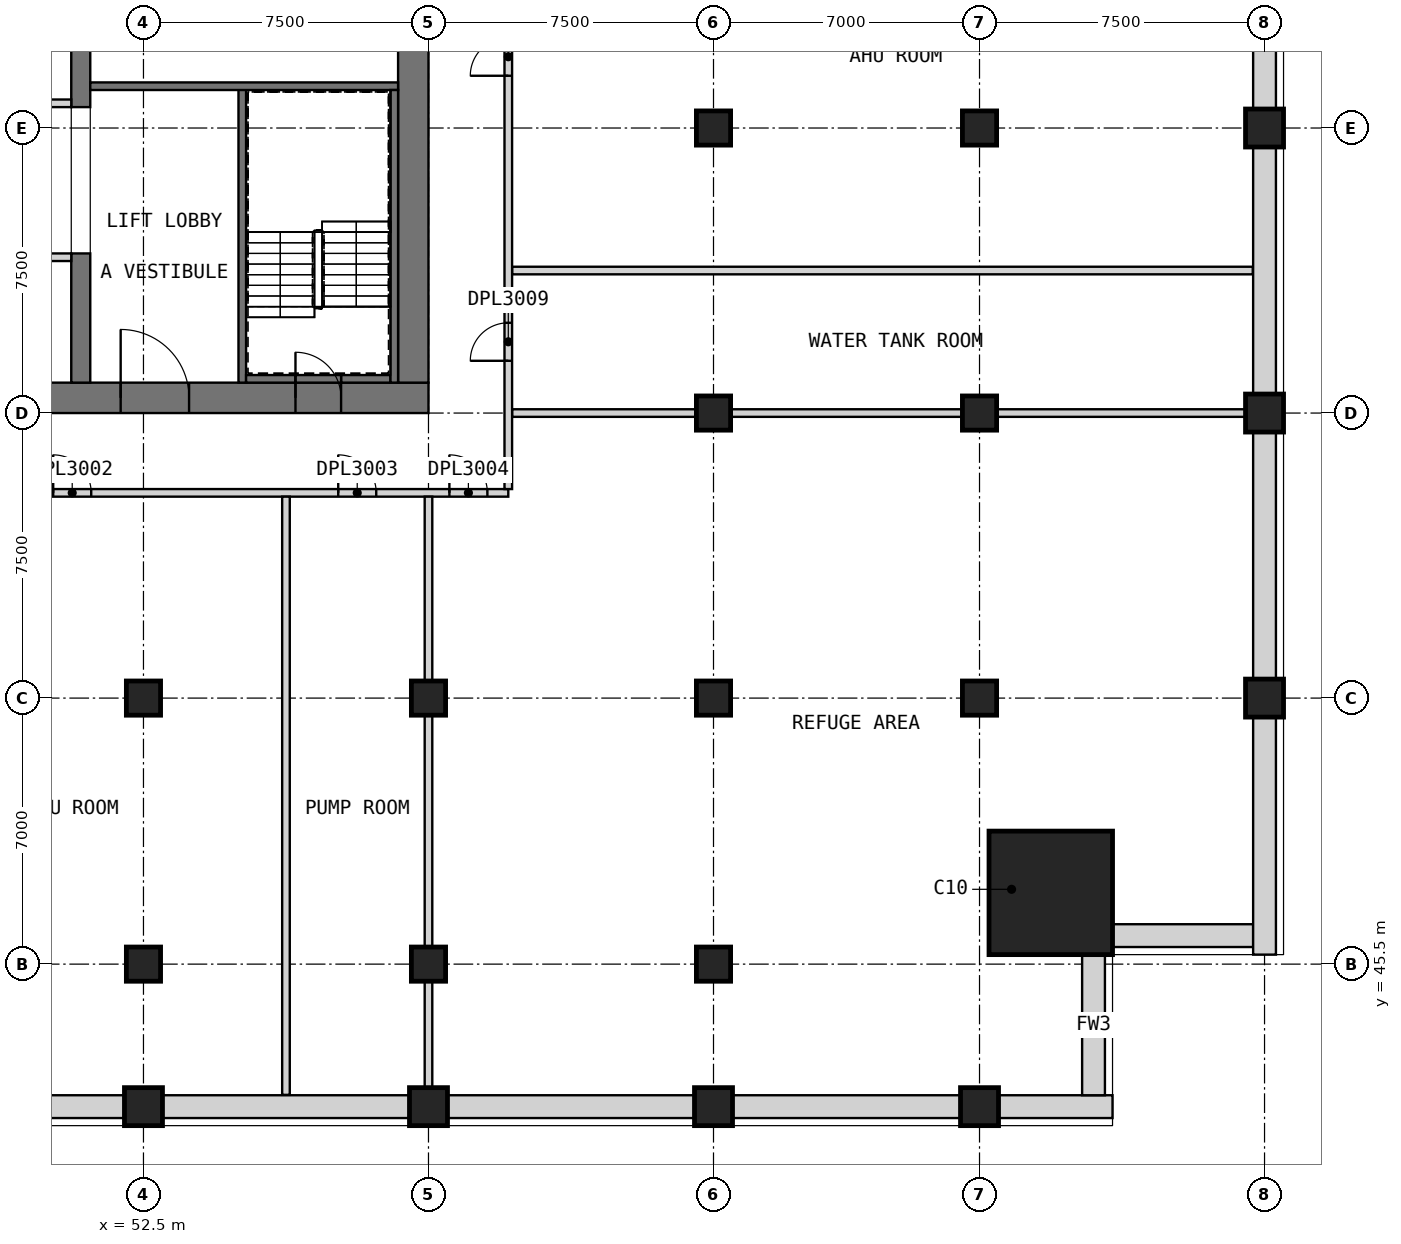
"""IFC4 building model, lengths in metres.
Left out: names, types, materials, properties, quantities, classifications, styles, units other than length and angle.
Written with IfcOpenShell. Run it as: python <this file> out.ifc"""

import sys

from ifc_helpers import new_model, si_unit, direction, frame, frame_2d, origin, origin_2d, place, context, subcontext, project, spatial, rectangle, extrude, element, fill, save


model = new_model("IFC4")
c1 = context("Model", 3, precision=1e-05, world=origin(), true_north=direction((0.0, 1.0)))
c2 = subcontext(c1, "Body", "Model", "MODEL_VIEW")
j1 = project(units=[si_unit("LENGTHUNIT", "METRE"), si_unit("PLANEANGLEUNIT", "RADIAN")], contexts=[c1])
p1 = place(None, origin())
s1 = spatial("IfcSite", under=j1, at=p1, CompositionType="ELEMENT")
p2 = place(p1, origin())
s2 = spatial("IfcBuilding", under=s1, at=p2, CompositionType="ELEMENT")
p3 = place(p2, frame((0.0, 0.0, 214.2)))
s3 = spatial("IfcBuildingStorey", under=s2, at=p3, CompositionType="ELEMENT", Elevation=214.2)
for number, where, z_axis, x_axis in (
    (1, (52.5, 41.75, 0.0), (0.0, 0.0, 1.0), (1.0, 0.0, 0.0)),
    (2, (60.0, 41.75, 0.0), (0.0, 0.0, 1.0), (1.0, 0.0, 0.0)),
    (3, (67.5, 41.75, 0.0), (0.0, 0.0, 1.0), (1.0, 0.0, 0.0)),
    (4, (74.5, 41.75, 0.0), (0.0, 0.0, 1.0), (1.0, 0.0, 0.0)),
):
    element("IfcColumn", number, at=place(p3, frame(where, z_axis=z_axis, x_axis=x_axis)), inside=s3, PredefinedType="COLUMN", context=c2, shape_type="SweptSolid", body=[
        extrude(rectangle(XDim=1.0, YDim=1.0, at=origin_2d()), origin(), (0.0, 0.0, 1.0), 5.5),
    ])
for number, where, z_axis, x_axis in (
    (5, (52.5, 45.5, 0.0), (0.0, 0.0, 1.0), (1.0, 0.0, 0.0)),
    (6, (52.5, 52.5, 0.0), (0.0, 0.0, 1.0), (1.0, 0.0, 0.0)),
    (7, (60.0, 45.5, 0.0), (0.0, 0.0, 1.0), (1.0, 0.0, 0.0)),
    (8, (60.0, 52.5, 0.0), (0.0, 0.0, 1.0), (1.0, 0.0, 0.0)),
    (9, (67.5, 45.5, 0.0), (0.0, 0.0, 1.0), (1.0, 0.0, 0.0)),
    (10, (67.5, 52.5, 0.0), (0.0, 0.0, 1.0), (1.0, 0.0, 0.0)),
    (11, (67.5, 60.0, 0.0), (0.0, 0.0, 1.0), (1.0, 0.0, 0.0)),
    (12, (67.5, 67.5, 0.0), (0.0, 0.0, 1.0), (1.0, 0.0, 0.0)),
    (13, (74.5, 52.5, 0.0), (0.0, 0.0, 1.0), (1.0, 0.0, 0.0)),
    (14, (74.5, 60.0, 0.0), (0.0, 0.0, 1.0), (1.0, 0.0, 0.0)),
    (15, (74.5, 67.5, 0.0), (0.0, 0.0, 1.0), (1.0, 0.0, 0.0)),
):
    element("IfcColumn", number, at=place(p3, frame(where, z_axis=z_axis, x_axis=x_axis)), inside=s3, PredefinedType="COLUMN", context=c2, shape_type="SweptSolid", body=[
        extrude(rectangle(XDim=0.9, YDim=0.9, at=origin_2d()), origin(), (0.0, 0.0, 1.0), 5.5),
    ])
for number, where, z_axis, x_axis in (
    (16, (82.0, 52.5, 0.0), (0.0, 0.0, 1.0), (1.0, 0.0, 0.0)),
    (17, (82.0, 60.0, 0.0), (0.0, 0.0, 1.0), (1.0, 0.0, 0.0)),
    (18, (82.0, 67.5, 0.0), (0.0, 0.0, 1.0), (1.0, 0.0, 0.0)),
):
    element("IfcColumn", number, at=place(p3, frame(where, z_axis=z_axis, x_axis=x_axis)), inside=s3, PredefinedType="COLUMN", context=c2, shape_type="SweptSolid", body=[
        extrude(rectangle(XDim=1.0, YDim=1.0, at=origin_2d()), origin(), (0.0, 0.0, 1.0), 5.5),
    ])
p4 = place(p3, frame((76.375, 47.375, 0.0), z_axis=(0.0, 0.0, 1.0), x_axis=(0.0, 1.0, 0.0)))
e19 = element("IfcColumn", 19, at=p4, inside=s3, PredefinedType="COLUMN", context=c2, shape_type="SweptSolid", body=[
    extrude(rectangle(XDim=3.25, YDim=3.25, at=origin_2d()), origin(), (0.032, 0.351, 0.936), 5.877),
])
p5 = place(p3, frame((30.0, 60.4, 0.0), z_axis=(0.0, 0.0, 1.0), x_axis=(1.0, 0.0, 0.0)))
e20 = element("IfcWall", 20, at=p5, inside=s3, PredefinedType="SHEAR", context=c2, shape_type="SweptSolid", body=[
    extrude(rectangle(XDim=30.0, YDim=0.8, at=frame_2d((15.0, 0.0))), origin(), (0.0, 0.0, 1.0), 5.5),
])
p6 = place(p5, frame((21.9, 0.0, 0.0)))
e21 = element("IfcOpeningElement", 21, at=p6, cuts=e20, PredefinedType="OPENING", context=c2, shape_type="SweptSolid", body=[
    extrude(rectangle(XDim=1.8, YDim=2.1, at=frame_2d((0.9, 1.05))), frame((0.0, 0.41, 0.0), z_axis=(0.0, -1.0, 0.0), x_axis=(1.0, 0.0, 0.0)), (0.0, 0.0, 1.0), 0.82),
])
p7 = place(p5, frame((26.5, 0.0, 0.0)))
e22 = element("IfcOpeningElement", 22, at=p7, cuts=e20, PredefinedType="OPENING", context=c2, shape_type="SweptSolid", body=[
    extrude(rectangle(XDim=1.2, YDim=2.1, at=frame_2d((0.6, 1.05))), frame((0.0, 0.41, 0.0), z_axis=(0.0, -1.0, 0.0), x_axis=(1.0, 0.0, 0.0)), (0.0, 0.0, 1.0), 0.82),
])
p8 = place(p3, frame((59.6, 60.8, 0.0), z_axis=(0.0, 0.0, 1.0), x_axis=(0.0, 1.0, 0.0)))
e23 = element("IfcWall", 23, at=p8, inside=s3, PredefinedType="SHEAR", context=c2, shape_type="SweptSolid", body=[
    extrude(rectangle(XDim=20.9, YDim=0.8, at=frame_2d((10.45, 0.0))), origin(), (0.0, 0.0, 1.0), 5.5),
])
p9 = place(p8, frame((14.7, 0.0, 0.0)))
e24 = element("IfcOpeningElement", 24, at=p9, cuts=e23, PredefinedType="OPENING", context=c2, shape_type="SweptSolid", body=[
    extrude(rectangle(XDim=1.8, YDim=2.1, at=frame_2d((0.9, 1.05))), frame((0.0, 0.41, 0.0), z_axis=(0.0, -1.0, 0.0), x_axis=(1.0, 0.0, 0.0)), (0.0, 0.0, 1.0), 0.82),
])
p10 = place(p3, frame((50.85, 60.8, 0.0), z_axis=(0.0, 0.0, 1.0), x_axis=(0.0, 1.0, 0.0)))
e25 = element("IfcWall", 25, at=p10, inside=s3, PredefinedType="SHEAR", context=c2, shape_type="SweptSolid", body=[
    extrude(rectangle(XDim=3.4, YDim=0.5, at=frame_2d((1.7, 0.0))), origin(), (0.0, 0.0, 1.0), 5.5),
])
p11 = place(p3, frame((50.85, 68.05, 0.0), z_axis=(0.0, 0.0, 1.0), x_axis=(0.0, 1.0, 0.0)))
e26 = element("IfcWall", 26, at=p11, inside=s3, PredefinedType="SHEAR", context=c2, shape_type="SweptSolid", body=[
    extrude(rectangle(XDim=6.4, YDim=0.5, at=frame_2d((3.2, 0.0))), origin(), (0.0, 0.0, 1.0), 5.5),
])
for number, where, z_axis, x_axis in (
    (27, (45.5, 41.75, 0.0), (0.0, 0.0, 1.0), (1.0, 0.0, 0.0)),
    (28, (53.0, 41.75, 0.0), (0.0, 0.0, 1.0), (1.0, 0.0, 0.0)),
    (29, (60.5, 41.75, 0.0), (0.0, 0.0, 1.0), (1.0, 0.0, 0.0)),
):
    element("IfcWall", number, at=place(p3, frame(where, z_axis=z_axis, x_axis=x_axis)), inside=s3, PredefinedType="ELEMENTEDWALL", context=c2, shape_type="SweptSolid", body=[
        extrude(rectangle(XDim=6.5, YDim=0.6, at=frame_2d((3.25, 0.0))), origin(), (0.0, 0.0, 1.0), 4.75),
    ])
p12 = place(p3, frame((68.0, 41.75, 0.0), z_axis=(0.0, 0.0, 1.0), x_axis=(1.0, 0.0, 0.0)))
e30 = element("IfcWall", 30, at=p12, inside=s3, PredefinedType="ELEMENTEDWALL", context=c2, shape_type="SweptSolid", body=[
    extrude(rectangle(XDim=6.0, YDim=0.6, at=frame_2d((3.0, 0.0))), origin(), (0.0, 0.0, 1.0), 4.75),
])
p13 = place(p3, frame((75.0, 41.75, 0.0), z_axis=(0.0, 0.0, 1.0), x_axis=(1.0, 0.0, 0.0)))
e31 = element("IfcWall", 31, at=p13, inside=s3, PredefinedType="ELEMENTEDWALL", context=c2, shape_type="SweptSolid", body=[
    extrude(rectangle(XDim=3.0, YDim=0.6, at=frame_2d((1.5, 0.0))), origin(), (0.0, 0.0, 1.0), 5.25),
])
for number, where, z_axis, x_axis in (
    (32, (77.5, 42.05, 0.0), (0.0, 0.0, 1.0), (0.0, 1.0, 0.0)),
    (33, (78.0, 46.25, 0.0), (0.0, 0.0, 1.0), (1.0, 0.0, 0.0)),
):
    element("IfcWall", number, at=place(p3, frame(where, z_axis=z_axis, x_axis=x_axis)), inside=s3, PredefinedType="ELEMENTEDWALL", context=c2, shape_type="SweptSolid", body=[
        extrude(rectangle(XDim=3.7, YDim=0.6, at=frame_2d((1.85, 0.0))), origin(), (0.0, 0.0, 1.0), 5.25),
    ])
p14 = place(p3, frame((82.0, 45.75, 0.0), z_axis=(0.0, 0.0, 1.0), x_axis=(0.0, 1.0, 0.0)))
e34 = element("IfcWall", 34, at=p14, inside=s3, PredefinedType="ELEMENTEDWALL", context=c2, shape_type="SweptSolid", body=[
    extrude(rectangle(XDim=6.25, YDim=0.6, at=frame_2d((3.125, 0.0))), origin(), (0.0, 0.0, 1.0), 5.25),
])
for number, where, z_axis, x_axis in (
    (35, (82.0, 53.0, 0.0), (0.0, 0.0, 1.0), (0.0, 1.0, 0.0)),
    (36, (82.0, 60.5, 0.0), (0.0, 0.0, 1.0), (0.0, 1.0, 0.0)),
    (37, (82.0, 68.0, 0.0), (0.0, 0.0, 1.0), (0.0, 1.0, 0.0)),
):
    element("IfcWall", number, at=place(p3, frame(where, z_axis=z_axis, x_axis=x_axis)), inside=s3, PredefinedType="ELEMENTEDWALL", context=c2, shape_type="SweptSolid", body=[
        extrude(rectangle(XDim=6.5, YDim=0.6, at=frame_2d((3.25, 0.0))), origin(), (0.0, 0.0, 1.0), 5.25),
    ])
p15 = place(p3, frame((35.0, 64.1, 0.0), z_axis=(0.0, 0.0, 1.0), x_axis=(1.0, 0.0, 0.0)))
e38 = element("IfcWall", 38, at=p15, inside=s3, PredefinedType="PARTITIONING", context=c2, shape_type="SweptSolid", body=[
    extrude(rectangle(XDim=15.6, YDim=0.2, at=frame_2d((7.8, 0.0))), origin(), (0.0, 0.0, 1.0), 5.25),
])
p16 = place(p15, frame((4.225, 0.0, 0.0)))
e39 = element("IfcOpeningElement", 39, at=p16, cuts=e38, PredefinedType="OPENING", context=c2, shape_type="SweptSolid", body=[
    extrude(rectangle(XDim=0.9, YDim=2.1, at=frame_2d((0.45, 1.05))), frame((0.0, 0.11, 0.0), z_axis=(0.0, -1.0, 0.0), x_axis=(1.0, 0.0, 0.0)), (0.0, 0.0, 1.0), 0.22),
])
p17 = place(p15, frame((12.025, 0.0, 0.0)))
e40 = element("IfcOpeningElement", 40, at=p17, cuts=e38, PredefinedType="OPENING", context=c2, shape_type="SweptSolid", body=[
    extrude(rectangle(XDim=0.9, YDim=2.1, at=frame_2d((0.45, 1.05))), frame((0.0, 0.11, 0.0), z_axis=(0.0, -1.0, 0.0), x_axis=(1.0, 0.0, 0.0)), (0.0, 0.0, 1.0), 0.22),
])
p18 = place(p3, frame((35.0, 68.15, 0.0), z_axis=(0.0, 0.0, 1.0), x_axis=(1.0, 0.0, 0.0)))
e41 = element("IfcWall", 41, at=p18, inside=s3, PredefinedType="PARTITIONING", context=c2, shape_type="SweptSolid", body=[
    extrude(rectangle(XDim=15.6, YDim=0.2, at=frame_2d((7.8, 0.0))), origin(), (0.0, 0.0, 1.0), 5.25),
])
p19 = place(p18, frame((4.0, 0.0, 0.0)))
e42 = element("IfcOpeningElement", 42, at=p19, cuts=e41, PredefinedType="OPENING", context=c2, shape_type="SweptSolid", body=[
    extrude(rectangle(XDim=0.9, YDim=2.1, at=frame_2d((0.45, 1.05))), frame((0.0, 0.11, 0.0), z_axis=(0.0, -1.0, 0.0), x_axis=(1.0, 0.0, 0.0)), (0.0, 0.0, 1.0), 0.22),
])
p20 = place(p18, frame((11.8, 0.0, 0.0)))
e43 = element("IfcOpeningElement", 43, at=p20, cuts=e41, PredefinedType="OPENING", context=c2, shape_type="SweptSolid", body=[
    extrude(rectangle(XDim=0.9, YDim=2.1, at=frame_2d((0.45, 1.05))), frame((0.0, 0.11, 0.0), z_axis=(0.0, -1.0, 0.0), x_axis=(1.0, 0.0, 0.0)), (0.0, 0.0, 1.0), 0.22),
])
p21 = place(p3, frame((55.1, 60.8, 0.0), z_axis=(0.0, 0.0, 1.0), x_axis=(0.0, 1.0, 0.0)))
e44 = element("IfcWall", 44, at=p21, inside=s3, PredefinedType="SOLIDWALL", context=c2, shape_type="SweptSolid", body=[
    extrude(rectangle(XDim=7.8, YDim=0.2, at=frame_2d((3.9, 0.0))), origin(), (0.0, 0.0, 1.0), 5.25),
])
p22 = place(p3, frame((51.1, 68.6, 0.0), z_axis=(0.0, 0.0, 1.0), x_axis=(1.0, 0.0, 0.0)))
e45 = element("IfcWall", 45, at=p22, inside=s3, PredefinedType="SOLIDWALL", context=c2, shape_type="SweptSolid", body=[
    extrude(rectangle(XDim=8.1, YDim=0.2, at=frame_2d((4.05, 0.0))), origin(), (0.0, 0.0, 1.0), 5.25),
])
for number, where, z_axis, x_axis in (
    (46, (55.2, 60.9, 0.0), (0.0, 0.0, 1.0), (1.0, 0.0, 0.0)),
    (47, (57.7, 60.9, 0.0), (0.0, 0.0, 1.0), (1.0, 0.0, 0.0)),
):
    element("IfcWall", number, at=place(p3, frame(where, z_axis=z_axis, x_axis=x_axis)), inside=s3, PredefinedType="SOLIDWALL", context=c2, shape_type="SweptSolid", body=[
        extrude(rectangle(XDim=1.3, YDim=0.2, at=frame_2d((0.65, 0.0))), origin(), (0.0, 0.0, 1.0), 5.25),
    ])
p23 = place(p3, frame((59.1, 60.8, 0.0), z_axis=(0.0, 0.0, 1.0), x_axis=(0.0, 1.0, 0.0)))
e48 = element("IfcWall", 48, at=p23, inside=s3, PredefinedType="SOLIDWALL", context=c2, shape_type="SweptSolid", body=[
    extrude(rectangle(XDim=7.7, YDim=0.2, at=frame_2d((3.85, 0.0))), origin(), (0.0, 0.0, 1.0), 5.25),
])
p24 = place(p3, frame((56.5, 60.9, 3.2), z_axis=(0.0, 0.0, 1.0), x_axis=(1.0, 0.0, 0.0)))
e49 = element("IfcWall", 49, at=p24, inside=s3, PredefinedType="SOLIDWALL", context=c2, shape_type="SweptSolid", body=[
    extrude(rectangle(XDim=1.2, YDim=0.2, at=frame_2d((0.6, 0.0))), origin(), (0.0, 0.0, 1.0), 2.05),
])
p25 = place(p3, frame((33.75, 57.9, 0.0), z_axis=(0.0, 0.0, 1.0), x_axis=(1.0, 0.0, 0.0)))
e50 = element("IfcWall", 50, at=p25, inside=s3, PredefinedType="PARTITIONING", context=c2, shape_type="SweptSolid", body=[
    extrude(rectangle(XDim=28.35, YDim=0.2, at=frame_2d((14.175, 0.0))), origin(), (0.0, 0.0, 1.0), 5.25),
])
p26 = place(p25, frame((5.125, 0.0, 0.0)))
e51 = element("IfcOpeningElement", 51, at=p26, cuts=e50, PredefinedType="OPENING", context=c2, shape_type="SweptSolid", body=[
    extrude(rectangle(XDim=1.0, YDim=2.1, at=frame_2d((0.5, 1.05))), frame((0.0, 0.11, 0.0), z_axis=(0.0, -1.0, 0.0), x_axis=(1.0, 0.0, 0.0)), (0.0, 0.0, 1.0), 0.22),
])
p27 = place(p25, frame((16.375, 0.0, 0.0)))
e52 = element("IfcOpeningElement", 52, at=p27, cuts=e50, PredefinedType="OPENING", context=c2, shape_type="SweptSolid", body=[
    extrude(rectangle(XDim=1.0, YDim=2.1, at=frame_2d((0.5, 1.05))), frame((0.0, 0.11, 0.0), z_axis=(0.0, -1.0, 0.0), x_axis=(1.0, 0.0, 0.0)), (0.0, 0.0, 1.0), 0.22),
])
p28 = place(p25, frame((23.875, 0.0, 0.0)))
e53 = element("IfcOpeningElement", 53, at=p28, cuts=e50, PredefinedType="OPENING", context=c2, shape_type="SweptSolid", body=[
    extrude(rectangle(XDim=1.0, YDim=2.1, at=frame_2d((0.5, 1.05))), frame((0.0, 0.11, 0.0), z_axis=(0.0, -1.0, 0.0), x_axis=(1.0, 0.0, 0.0)), (0.0, 0.0, 1.0), 0.22),
])
p29 = place(p25, frame((26.8, 0.0, 0.0)))
e54 = element("IfcOpeningElement", 54, at=p29, cuts=e50, PredefinedType="OPENING", context=c2, shape_type="SweptSolid", body=[
    extrude(rectangle(XDim=1.0, YDim=2.1, at=frame_2d((0.5, 1.05))), frame((0.0, 0.11, 0.0), z_axis=(0.0, -1.0, 0.0), x_axis=(1.0, 0.0, 0.0)), (0.0, 0.0, 1.0), 0.22),
])
p30 = place(p3, frame((62.2, 60.0, 0.0), z_axis=(0.0, 0.0, 1.0), x_axis=(1.0, 0.0, 0.0)))
e55 = element("IfcWall", 55, at=p30, inside=s3, PredefinedType="PARTITIONING", context=c2, shape_type="SweptSolid", body=[
    extrude(rectangle(XDim=20.3, YDim=0.2, at=frame_2d((10.15, 0.0))), origin(), (0.0, 0.0, 1.0), 4.0),
])
p31 = place(p3, frame((62.2, 63.75, 0.0), z_axis=(0.0, 0.0, 1.0), x_axis=(1.0, 0.0, 0.0)))
e56 = element("IfcWall", 56, at=p31, inside=s3, PredefinedType="PARTITIONING", context=c2, shape_type="SweptSolid", body=[
    extrude(rectangle(XDim=19.49, YDim=0.2, at=frame_2d((9.745, 0.0))), origin(), (0.0, 0.0, 1.0), 5.25),
])
p32 = place(p3, frame((56.25, 42.06, 0.0), z_axis=(0.0, 0.0, 1.0), x_axis=(0.0, 1.0, 0.0)))
e57 = element("IfcWall", 57, at=p32, inside=s3, PredefinedType="PARTITIONING", context=c2, shape_type="SweptSolid", body=[
    extrude(rectangle(XDim=15.74, YDim=0.2, at=frame_2d((7.87, 0.0))), origin(), (0.0, 0.0, 1.0), 5.25),
])
p33 = place(p3, frame((60.0, 41.25, 0.0), z_axis=(0.0, 0.0, 1.0), x_axis=(0.0, 1.0, 0.0)))
e58 = element("IfcWall", 58, at=p33, inside=s3, PredefinedType="PARTITIONING", context=c2, shape_type="SweptSolid", body=[
    extrude(rectangle(XDim=16.55, YDim=0.2, at=frame_2d((8.275, 0.0))), origin(), (0.0, 0.0, 1.0), 5.25),
])
p34 = place(p3, frame((62.1, 58.0, 0.0), z_axis=(0.0, 0.0, 1.0), x_axis=(0.0, 1.0, 0.0)))
e59 = element("IfcWall", 59, at=p34, inside=s3, PredefinedType="PARTITIONING", context=c2, shape_type="SweptSolid", body=[
    extrude(rectangle(XDim=26.5, YDim=0.2, at=frame_2d((13.25, 0.0))), origin(), (0.0, 0.0, 1.0), 5.25),
])
p35 = place(p34, frame((24.61, 0.0, 0.0)))
e60 = element("IfcOpeningElement", 60, at=p35, cuts=e59, PredefinedType="OPENING", context=c2, shape_type="SweptSolid", body=[
    extrude(rectangle(XDim=1.0, YDim=2.1, at=frame_2d((0.5, 1.05))), frame((0.0, 0.11, 0.0), z_axis=(0.0, -1.0, 0.0), x_axis=(1.0, 0.0, 0.0)), (0.0, 0.0, 1.0), 0.22),
])
p36 = place(p34, frame((3.375, 0.0, 0.0)))
e61 = element("IfcOpeningElement", 61, at=p36, cuts=e59, PredefinedType="OPENING", context=c2, shape_type="SweptSolid", body=[
    extrude(rectangle(XDim=1.0, YDim=2.1, at=frame_2d((0.5, 1.05))), frame((0.0, 0.11, 0.0), z_axis=(0.0, -1.0, 0.0), x_axis=(1.0, 0.0, 0.0)), (0.0, 0.0, 1.0), 0.22),
])
p37 = place(p34, frame((10.875, 0.0, 0.0)))
e62 = element("IfcOpeningElement", 62, at=p37, cuts=e59, PredefinedType="OPENING", context=c2, shape_type="SweptSolid", body=[
    extrude(rectangle(XDim=1.0, YDim=2.1, at=frame_2d((0.5, 1.05))), frame((0.0, 0.11, 0.0), z_axis=(0.0, -1.0, 0.0), x_axis=(1.0, 0.0, 0.0)), (0.0, 0.0, 1.0), 0.22),
])
p38 = place(p34, frame((20.25, 0.0, 0.0)))
e63 = element("IfcOpeningElement", 63, at=p38, cuts=e59, PredefinedType="OPENING", context=c2, shape_type="SweptSolid", body=[
    extrude(rectangle(XDim=1.0, YDim=2.1, at=frame_2d((0.5, 1.05))), frame((0.0, 0.11, 0.0), z_axis=(0.0, -1.0, 0.0), x_axis=(1.0, 0.0, 0.0)), (0.0, 0.0, 1.0), 0.22),
])
p39 = place(p6, origin())
e64 = element("IfcDoor", 64, at=p39, inside=s3, OperationType="DOUBLE_DOOR_SINGLE_SWING", PredefinedType="DOOR", context=c2, shape_type="SweptSolid", body=[
    extrude(rectangle(XDim=1.8, YDim=2.1, at=frame_2d((0.9, 1.05))), frame((0.0, 0.025, 0.0), z_axis=(0.0, -1.0, 0.0), x_axis=(1.0, 0.0, 0.0)), (0.0, 0.0, 1.0), 0.05),
])
fill(e21, e64)
p40 = place(p7, origin())
e65 = element("IfcDoor", 65, at=p40, inside=s3, OperationType="SINGLE_SWING_LEFT", PredefinedType="DOOR", context=c2, shape_type="SweptSolid", body=[
    extrude(rectangle(XDim=1.2, YDim=2.1, at=frame_2d((0.6, 1.05))), frame((0.0, 0.025, 0.0), z_axis=(0.0, -1.0, 0.0), x_axis=(1.0, 0.0, 0.0)), (0.0, 0.0, 1.0), 0.05),
])
fill(e22, e65)
p41 = place(p27, origin())
e66 = element("IfcDoor", 66, at=p41, inside=s3, OperationType="SINGLE_SWING_RIGHT", PredefinedType="DOOR", context=c2, shape_type="SweptSolid", body=[
    extrude(rectangle(XDim=1.0, YDim=2.1, at=frame_2d((0.5, 1.05))), frame((0.0, 0.025, 0.0), z_axis=(0.0, -1.0, 0.0), x_axis=(1.0, 0.0, 0.0)), (0.0, 0.0, 1.0), 0.05),
])
fill(e52, e66)
p42 = place(p28, origin())
e67 = element("IfcDoor", 67, at=p42, inside=s3, OperationType="SINGLE_SWING_RIGHT", PredefinedType="DOOR", context=c2, shape_type="SweptSolid", body=[
    extrude(rectangle(XDim=1.0, YDim=2.1, at=frame_2d((0.5, 1.05))), frame((0.0, 0.025, 0.0), z_axis=(0.0, -1.0, 0.0), x_axis=(1.0, 0.0, 0.0)), (0.0, 0.0, 1.0), 0.05),
])
fill(e53, e67)
p43 = place(p29, origin())
e68 = element("IfcDoor", 68, at=p43, inside=s3, OperationType="SINGLE_SWING_RIGHT", PredefinedType="DOOR", context=c2, shape_type="SweptSolid", body=[
    extrude(rectangle(XDim=1.0, YDim=2.1, at=frame_2d((0.5, 1.05))), frame((0.0, 0.025, 0.0), z_axis=(0.0, -1.0, 0.0), x_axis=(1.0, 0.0, 0.0)), (0.0, 0.0, 1.0), 0.05),
])
fill(e54, e68)
p44 = place(p36, origin())
e69 = element("IfcDoor", 69, at=p44, inside=s3, OperationType="SINGLE_SWING_RIGHT", PredefinedType="DOOR", context=c2, shape_type="SweptSolid", body=[
    extrude(rectangle(XDim=1.0, YDim=2.1, at=frame_2d((0.5, 1.05))), frame((0.0, 0.025, 0.0), z_axis=(0.0, -1.0, 0.0), x_axis=(1.0, 0.0, 0.0)), (0.0, 0.0, 1.0), 0.05),
])
fill(e61, e69)
p45 = place(p37, origin())
e70 = element("IfcDoor", 70, at=p45, inside=s3, OperationType="SINGLE_SWING_RIGHT", PredefinedType="DOOR", context=c2, shape_type="SweptSolid", body=[
    extrude(rectangle(XDim=1.0, YDim=2.1, at=frame_2d((0.5, 1.05))), frame((0.0, 0.025, 0.0), z_axis=(0.0, -1.0, 0.0), x_axis=(1.0, 0.0, 0.0)), (0.0, 0.0, 1.0), 0.05),
])
fill(e62, e70)
save(model, sys.argv[1])
